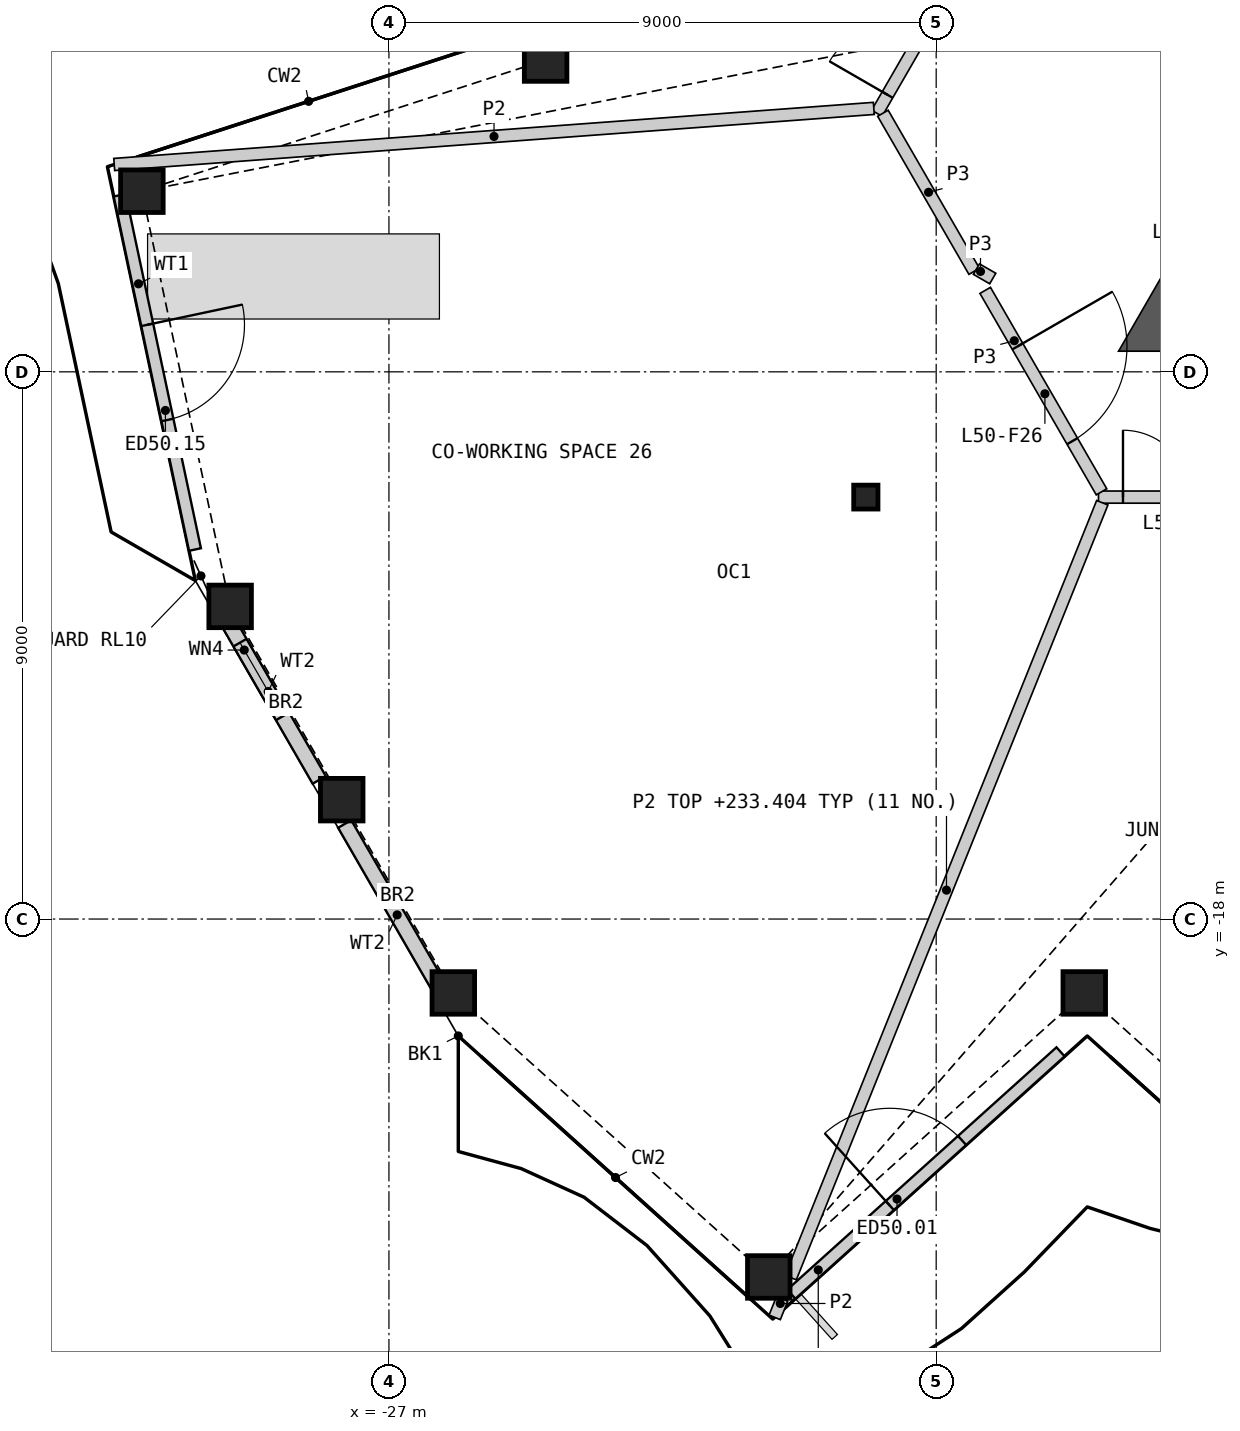
"""IFC4 building model, lengths in metres.
Left out: names, types, materials, properties, quantities, classifications, styles, units other than length and angle.
Written with IfcOpenShell. Run it as: python <this file> out.ifc"""

import sys

from ifc_helpers import new_model, si_unit, direction, frame, frame_2d, origin, origin_2d, place, context, subcontext, project, spatial, polyline, rectangle, hollow_rectangle, i_section, outline, extrude, element, fill, save


model = new_model("IFC4")
c1 = context("Model", 3, precision=1e-05, world=origin(), true_north=direction((0.0, 1.0)))
c2 = subcontext(c1, "Body", "Model", "MODEL_VIEW")
j1 = project(units=[si_unit("LENGTHUNIT", "METRE"), si_unit("PLANEANGLEUNIT", "RADIAN")], contexts=[c1])
p1 = place(None, origin())
s1 = spatial("IfcSite", under=j1, at=p1, CompositionType="ELEMENT")
p2 = place(p1, origin())
s2 = spatial("IfcBuilding", under=s1, at=p2, CompositionType="ELEMENT")
p3 = place(p2, frame((0.0, 0.0, 231.0)))
s3 = spatial("IfcBuildingStorey", under=s2, at=p3, CompositionType="ELEMENT", Elevation=231.0)
for number, where, z_axis, x_axis in (
    (1, (-25.941, -19.215, 0.0), (0.0, 0.0, 1.0), (1.0, 0.0, 0.0)),
    (2, (-20.753, -23.887, 0.0), (0.0, 0.0, 1.0), (1.0, 0.0, 0.0)),
    (3, (-15.565, -19.215, 0.0), (0.0, 0.0, 1.0), (1.0, 0.0, 0.0)),
    (4, (-24.423, -3.872, 0.0), (0.0, 0.0, 1.0), (1.0, 0.0, 0.0)),
    (5, (-31.063, -6.029, 0.0), (0.0, 0.0, 1.0), (1.0, 0.0, 0.0)),
    (6, (-29.612, -12.858, 0.0), (0.0, 0.0, 1.0), (1.0, 0.0, 0.0)),
    (7, (-27.776, -16.037, 0.0), (0.0, 0.0, 1.0), (1.0, 0.0, 0.0)),
):
    element("IfcColumn", number, at=place(p3, frame(where, z_axis=z_axis, x_axis=x_axis)), inside=s3, PredefinedType="COLUMN", context=c2, shape_type="SweptSolid", body=[
        extrude(hollow_rectangle(XDim=0.7, YDim=0.7, WallThickness=0.045, at=origin_2d()), origin(), (0.0, 0.0, 1.0), 3.6),
    ])
p4 = place(p3, frame((-19.157, -11.06, 0.0), z_axis=(0.0, 0.0, 1.0), x_axis=(1.0, 0.0, 0.0)))
e8 = element("IfcColumn", 8, at=p4, inside=s3, PredefinedType="COLUMN", context=c2, shape_type="SweptSolid", body=[
    extrude(i_section(OverallWidth=0.399, OverallDepth=0.393, WebThickness=0.023, FlangeThickness=0.037, at=origin_2d()), origin(), (0.0, 0.0, 1.0), 3.6),
])
p5 = place(p3, frame((-20.382, -24.17, 0.0), z_axis=(0.0, 0.0, 1.0), x_axis=(0.743161684399, 0.669111882155, 0.0)))
e9 = element("IfcWall", 9, at=p5, inside=s3, PredefinedType="SOLIDWALL", context=c2, shape_type="SweptSolid", body=[
    extrude(rectangle(XDim=5.958, YDim=0.2, at=frame_2d((2.979, 0.0))), origin(), (0.0, 0.0, 1.0), 2.701),
])
p6 = place(p5, frame((2.179, 0.0, 0.0)))
e10 = element("IfcOpeningElement", 10, at=p6, cuts=e9, PredefinedType="OPENING", context=c2, shape_type="SweptSolid", body=[
    extrude(rectangle(XDim=1.6, YDim=2.4, at=frame_2d((0.8, 1.2))), frame((0.0, 0.11, 0.0), z_axis=(0.0, -1.0, 0.0), x_axis=(1.0, 0.0, 0.0)), (0.0, 0.0, 1.0), 0.22),
])
p7 = place(p3, frame((-31.428, -6.095, 0.0), z_axis=(0.0, 0.0, 1.0), x_axis=(0.207939137045, -0.978141766456, 0.0)))
e11 = element("IfcWall", 11, at=p7, inside=s3, PredefinedType="SOLIDWALL", context=c2, shape_type="SweptSolid", body=[
    extrude(rectangle(XDim=5.957, YDim=0.2, at=frame_2d((2.979, 0.0))), origin(), (0.0, 0.0, 1.0), 2.701),
])
p8 = place(p7, frame((2.179, 0.0, 0.0)))
e12 = element("IfcOpeningElement", 12, at=p8, cuts=e11, PredefinedType="OPENING", context=c2, shape_type="SweptSolid", body=[
    extrude(rectangle(XDim=1.6, YDim=2.4, at=frame_2d((0.8, 1.2))), frame((0.0, 0.11, 0.0), z_axis=(0.0, -1.0, 0.0), x_axis=(1.0, 0.0, 0.0)), (0.0, 0.0, 1.0), 0.22),
])
p9 = place(p3, frame((-29.825, -12.805, 0.0), z_axis=(0.0, 0.0, 1.0), x_axis=(0.500003693016, -0.86602327161, 0.0)))
e13 = element("IfcWall", 13, at=p9, inside=s3, PredefinedType="SOLIDWALL", context=c2, shape_type="SweptSolid", body=[
    extrude(rectangle(XDim=3.356, YDim=0.25, at=frame_2d((1.678, 0.0))), origin(), (0.0, 0.0, 1.0), 2.701),
])
p10 = place(p9, frame((0.75, 0.0, 1.8)))
e14 = element("IfcOpeningElement", 14, at=p10, cuts=e13, PredefinedType="OPENING", context=c2, shape_type="SweptSolid", body=[
    extrude(rectangle(XDim=1.4, YDim=0.7, at=frame_2d((0.7, 0.35))), frame((0.0, 0.135, 0.0), z_axis=(0.0, -1.0, 0.0), x_axis=(1.0, 0.0, 0.0)), (0.0, 0.0, 1.0), 0.27),
])
p11 = place(p3, frame((-27.728, -16.437, 0.0), z_axis=(0.0, 0.0, 1.0), x_axis=(0.499987726745, -0.866032489635, 0.0)))
e15 = element("IfcWall", 15, at=p11, inside=s3, PredefinedType="SOLIDWALL", context=c2, shape_type="SweptSolid", body=[
    extrude(rectangle(XDim=3.452, YDim=0.25, at=frame_2d((1.726, 0.0))), origin(), (0.0, 0.0, 1.0), 2.701),
])
p12 = place(p3, origin())
e16 = element("IfcWall", 16, at=p12, inside=s3, PredefinedType="SHEAR", context=c2, shape_type="SweptSolid", body=[
    extrude(outline(polyline([(-13.874, -6.71), (-12.748, -7.36), (-12.748, -8.66), (-15.0, -8.66), (-13.874, -6.71)])), origin(), (0.0, 0.0, 1.0), 3.25),
])
p13 = place(p3, frame((-18.976, -4.747, 0.0), z_axis=(0.0, 0.0, 1.0), x_axis=(0.499999852422, 0.866025488988, 0.0)))
e17 = element("IfcWall", 17, at=p13, inside=s3, PredefinedType="PARTITIONING", context=c2, shape_type="SweptSolid", body=[
    extrude(rectangle(XDim=27.198, YDim=0.2, at=frame_2d((13.599, 0.0))), origin(), (0.0, 0.0, 1.0), 3.25),
])
p14 = place(p13, frame((25.346, 0.0, 0.0)))
e18 = element("IfcOpeningElement", 18, at=p14, cuts=e17, PredefinedType="OPENING", context=c2, shape_type="SweptSolid", body=[
    extrude(rectangle(XDim=1.1, YDim=2.1, at=frame_2d((0.55, 1.05))), frame((0.0, 0.11, 0.0), z_axis=(0.0, -1.0, 0.0), x_axis=(1.0, 0.0, 0.0)), (0.0, 0.0, 1.0), 0.22),
])
p15 = place(p13, frame((16.713, 0.0, 0.0)))
e19 = element("IfcOpeningElement", 19, at=p15, cuts=e17, PredefinedType="OPENING", context=c2, shape_type="SweptSolid", body=[
    extrude(rectangle(XDim=1.1, YDim=2.1, at=frame_2d((0.55, 1.05))), frame((0.0, 0.11, 0.0), z_axis=(0.0, -1.0, 0.0), x_axis=(1.0, 0.0, 0.0)), (0.0, 0.0, 1.0), 0.22),
])
p16 = place(p13, frame((0.35, 0.0, 0.0)))
e20 = element("IfcOpeningElement", 20, at=p16, cuts=e17, PredefinedType="OPENING", context=c2, shape_type="SweptSolid", body=[
    extrude(rectangle(XDim=1.1, YDim=2.1, at=frame_2d((0.55, 1.05))), frame((0.0, 0.11, 0.0), z_axis=(0.0, -1.0, 0.0), x_axis=(1.0, 0.0, 0.0)), (0.0, 0.0, 1.0), 0.22),
])
p17 = place(p3, frame((-15.331, -11.06, 0.0), z_axis=(0.0, 0.0, 1.0), x_axis=(1.0, 0.0, 0.0)))
e21 = element("IfcWall", 21, at=p17, inside=s3, PredefinedType="PARTITIONING", context=c2, shape_type="SweptSolid", body=[
    extrude(rectangle(XDim=5.543, YDim=0.2, at=frame_2d((2.771, 0.0))), origin(), (0.0, 0.0, 1.0), 3.25),
])
p18 = place(p17, frame((0.403, 0.0, 0.0)))
e22 = element("IfcOpeningElement", 22, at=p18, cuts=e21, PredefinedType="OPENING", context=c2, shape_type="SweptSolid", body=[
    extrude(rectangle(XDim=1.1, YDim=2.1, at=frame_2d((0.55, 1.05))), frame((0.0, 0.11, 0.0), z_axis=(0.0, -1.0, 0.0), x_axis=(1.0, 0.0, 0.0)), (0.0, 0.0, 1.0), 0.22),
])
p19 = place(p3, frame((-17.194, -7.66, 0.0), z_axis=(0.0, 0.0, 1.0), x_axis=(0.499989446428, -0.866031496806, 0.0)))
e23 = element("IfcWall", 23, at=p19, inside=s3, PredefinedType="PARTITIONING", context=c2, shape_type="SweptSolid", body=[
    extrude(rectangle(XDim=3.826, YDim=0.2, at=frame_2d((1.913, 0.0))), origin(), (0.0, 0.0, 1.0), 3.25),
])
p20 = place(p19, frame((1.064, 0.0, 0.0)))
e24 = element("IfcOpeningElement", 24, at=p20, cuts=e23, PredefinedType="OPENING", context=c2, shape_type="SweptSolid", body=[
    extrude(rectangle(XDim=1.8, YDim=2.1, at=frame_2d((0.9, 1.05))), frame((0.0, 0.11, 0.0), z_axis=(0.0, -1.0, 0.0), x_axis=(1.0, 0.0, 0.0)), (0.0, 0.0, 1.0), 0.22),
])
p21 = place(p3, frame((-18.876, -4.747, 0.0), z_axis=(0.0, 0.0, 1.0), x_axis=(0.499952404951, -0.866052881055, 0.0)))
e25 = element("IfcWall", 25, at=p21, inside=s3, PredefinedType="PARTITIONING", context=c2, shape_type="SweptSolid", body=[
    extrude(rectangle(XDim=3.002, YDim=0.2, at=frame_2d((1.501, 0.0))), origin(), (0.0, 0.0, 1.0), 3.25),
])
p22 = place(p3, frame((-17.338, -7.31, 0.0), z_axis=(0.0, 0.0, 1.0), x_axis=(0.866054481515, -0.499949632511, 0.0)))
e26 = element("IfcWall", 26, at=p22, inside=s3, PredefinedType="PARTITIONING", context=c2, shape_type="SweptSolid", body=[
    extrude(rectangle(XDim=0.31, YDim=0.2, at=frame_2d((0.155, 0.0))), origin(), (0.0, 0.0, 1.0), 3.25),
])
p23 = place(p3, frame((-20.393, -23.897, 0.0), z_axis=(0.0, 0.0, 1.0), x_axis=(0.373096979113, 0.927792349708, 0.0)))
e27 = element("IfcWall", 27, at=p23, inside=s3, PredefinedType="PARTITIONING", context=c2, shape_type="SweptSolid", body=[
    extrude(rectangle(XDim=13.736, YDim=0.2, at=frame_2d((6.868, 0.0))), origin(), (0.0, 0.0, 1.0), 2.404),
])
p24 = place(p3, frame((-31.518, -5.59, 0.0), z_axis=(0.0, 0.0, 1.0), x_axis=(0.99728681237, 0.073613951618, 0.0)))
e28 = element("IfcWall", 28, at=p24, inside=s3, PredefinedType="PARTITIONING", context=c2, shape_type="SweptSolid", body=[
    extrude(rectangle(XDim=12.526, YDim=0.2, at=frame_2d((6.263, 0.0))), origin(), (0.0, 0.0, 1.0), 2.404),
])
p25 = place(p3, frame((-20.656, -24.551, 0.0), z_axis=(0.0, 0.0, 1.0), x_axis=(0.372801499492, 0.927911117498, 0.0)))
e29 = element("IfcWall", 29, at=p25, inside=s3, PredefinedType="PARTITIONING", context=c2, shape_type="SweptSolid", body=[
    extrude(rectangle(XDim=0.328, YDim=0.2, at=frame_2d((0.164, 0.0))), origin(), (0.0, 0.0, 1.0), 2.404),
])
p26 = place(p6, origin())
e30 = element("IfcDoor", 30, at=p26, inside=s3, OperationType="DOUBLE_DOOR_SINGLE_SWING", PredefinedType="DOOR", context=c2, shape_type="SweptSolid", body=[
    extrude(rectangle(XDim=1.6, YDim=2.4, at=frame_2d((0.8, 1.2))), frame((0.0, 0.025, 0.0), z_axis=(0.0, -1.0, 0.0), x_axis=(1.0, 0.0, 0.0)), (0.0, 0.0, 1.0), 0.05),
])
fill(e10, e30)
p27 = place(p8, origin())
e31 = element("IfcDoor", 31, at=p27, inside=s3, OperationType="DOUBLE_DOOR_SINGLE_SWING", PredefinedType="DOOR", context=c2, shape_type="SweptSolid", body=[
    extrude(rectangle(XDim=1.6, YDim=2.4, at=frame_2d((0.8, 1.2))), frame((0.0, 0.025, 0.0), z_axis=(0.0, -1.0, 0.0), x_axis=(1.0, 0.0, 0.0)), (0.0, 0.0, 1.0), 0.05),
])
fill(e12, e31)
p28 = place(p10, origin())
e32 = element("IfcWindow", 32, at=p28, inside=s3, PartitioningType="SINGLE_PANEL", PredefinedType="WINDOW", context=c2, shape_type="SweptSolid", body=[
    extrude(rectangle(XDim=1.4, YDim=0.7, at=frame_2d((0.7, 0.35))), frame((0.0, 0.03, 0.0), z_axis=(0.0, -1.0, 0.0), x_axis=(1.0, 0.0, 0.0)), (0.0, 0.0, 1.0), 0.06),
])
fill(e14, e32)
p29 = place(p18, origin())
e33 = element("IfcDoor", 33, at=p29, inside=s3, OperationType="SINGLE_SWING_LEFT", PredefinedType="DOOR", context=c2, shape_type="SweptSolid", body=[
    extrude(rectangle(XDim=1.1, YDim=2.1, at=frame_2d((0.55, 1.05))), frame((0.0, 0.025, 0.0), z_axis=(0.0, -1.0, 0.0), x_axis=(1.0, 0.0, 0.0)), (0.0, 0.0, 1.0), 0.05),
])
fill(e22, e33)
p30 = place(p16, origin())
e34 = element("IfcDoor", 34, at=p30, inside=s3, OperationType="SINGLE_SWING_LEFT", PredefinedType="DOOR", context=c2, shape_type="SweptSolid", body=[
    extrude(rectangle(XDim=1.1, YDim=2.1, at=frame_2d((0.55, 1.05))), frame((0.0, 0.025, 0.0), z_axis=(0.0, -1.0, 0.0), x_axis=(1.0, 0.0, 0.0)), (0.0, 0.0, 1.0), 0.05),
])
fill(e20, e34)
p31 = place(p20, origin())
e35 = element("IfcDoor", 35, at=p31, inside=s3, OperationType="DOUBLE_DOOR_SINGLE_SWING", PredefinedType="DOOR", context=c2, shape_type="SweptSolid", body=[
    extrude(rectangle(XDim=1.8, YDim=2.1, at=frame_2d((0.9, 1.05))), frame((0.0, 0.025, 0.0), z_axis=(0.0, -1.0, 0.0), x_axis=(1.0, 0.0, 0.0)), (0.0, 0.0, 1.0), 0.05),
])
fill(e24, e35)
save(model, sys.argv[1])
